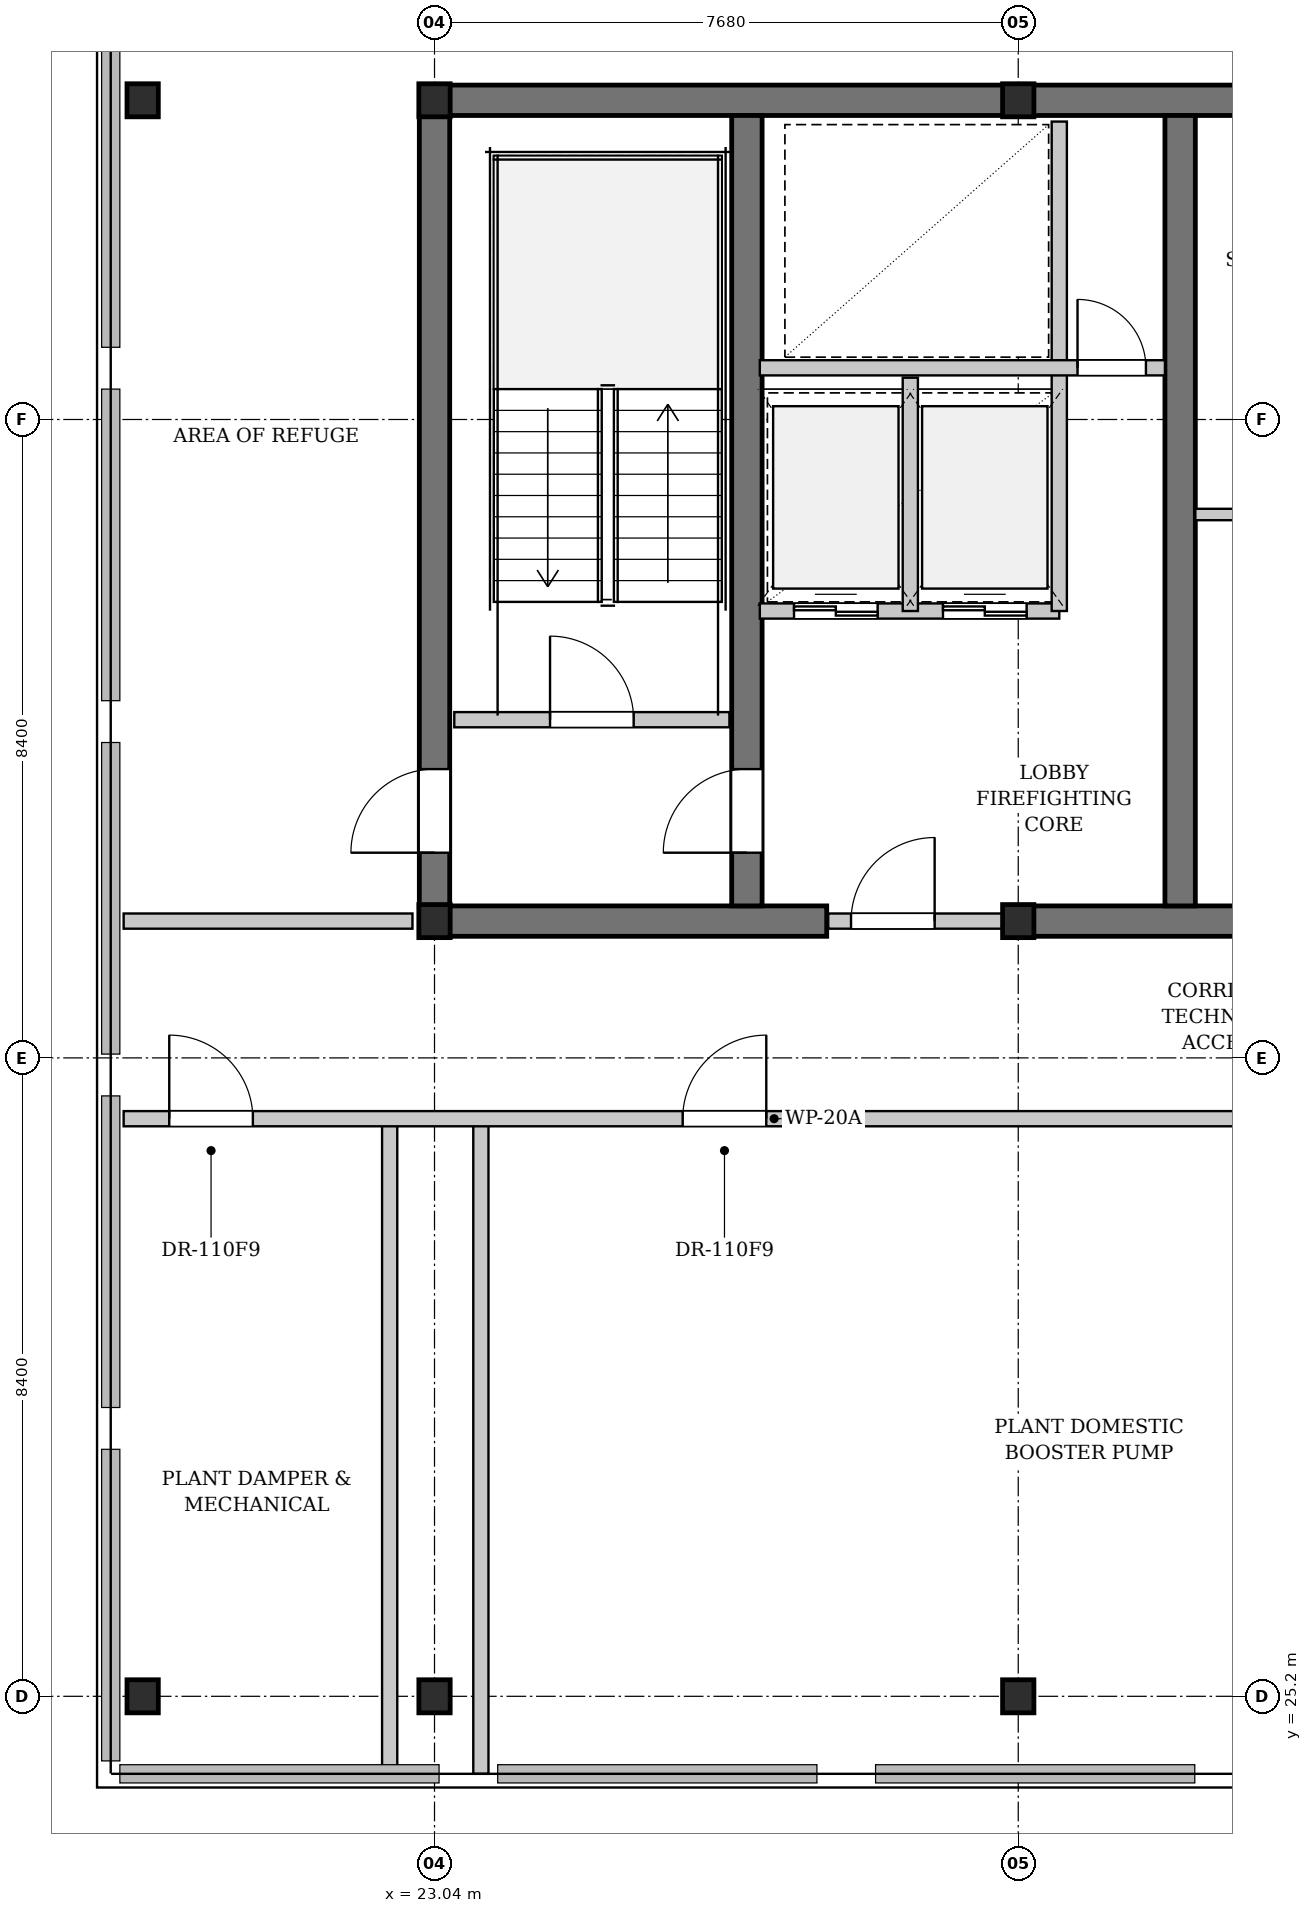
"""IFC4 building model, lengths in metres.
Left out: names, types, materials, properties, quantities, classifications, styles, units other than length and angle.
Written with IfcOpenShell. Run it as: python <this file> out.ifc"""

import sys

from ifc_helpers import new_model, si_unit, direction, frame, frame_2d, origin, origin_2d, place, context, subcontext, project, spatial, rectangle, i_section, extrude, element, fill, save


model = new_model("IFC4")
c1 = context("Model", 3, precision=1e-05, world=origin(), true_north=direction((0.0, 1.0)))
c2 = subcontext(c1, "Body", "Model", "MODEL_VIEW")
j1 = project(units=[si_unit("LENGTHUNIT", "METRE"), si_unit("PLANEANGLEUNIT", "RADIAN")], contexts=[c1])
p1 = place(None, origin())
s1 = spatial("IfcSite", under=j1, at=p1, CompositionType="ELEMENT")
p2 = place(p1, origin())
s2 = spatial("IfcBuilding", under=s1, at=p2, CompositionType="ELEMENT")
p3 = place(p2, frame((0.0, 0.0, 255.2)))
s3 = spatial("IfcBuildingStorey", under=s2, at=p3, CompositionType="ELEMENT", Elevation=255.2)
p4 = place(p3, frame((22.84, 46.2, 0.0), z_axis=(0.0, 0.0, 1.0), x_axis=(1.0, 0.0, 0.0)))
e1 = element("IfcWall", 1, at=p4, inside=s3, PredefinedType="SHEAR", context=c2, shape_type="SweptSolid", body=[
    extrude(rectangle(XDim=31.12, YDim=0.4, at=frame_2d((15.56, 0.0))), origin(), (0.0, 0.0, 1.0), 3.48),
])
p5 = place(p3, frame((22.84, 35.4, 0.0), z_axis=(0.0, 0.0, 1.0), x_axis=(1.0, 0.0, 0.0)))
e2 = element("IfcWall", 2, at=p5, inside=s3, PredefinedType="SHEAR", context=c2, shape_type="SweptSolid", body=[
    extrude(rectangle(XDim=5.36, YDim=0.4, at=frame_2d((2.68, 0.0))), origin(), (0.0, 0.0, 1.0), 3.48),
])
p6 = place(p3, frame((30.72, 35.4, 0.0), z_axis=(0.0, 0.0, 1.0), x_axis=(1.0, 0.0, 0.0)))
e3 = element("IfcWall", 3, at=p6, inside=s3, PredefinedType="SHEAR", context=c2, shape_type="SweptSolid", body=[
    extrude(rectangle(XDim=4.88, YDim=0.4, at=frame_2d((2.44, 0.0))), origin(), (0.0, 0.0, 1.0), 3.48),
])
p7 = place(p3, frame((23.04, 35.6, 0.0), z_axis=(0.0, 0.0, 1.0), x_axis=(0.0, 1.0, 0.0)))
e4 = element("IfcWall", 4, at=p7, inside=s3, PredefinedType="SHEAR", context=c2, shape_type="SweptSolid", body=[
    extrude(rectangle(XDim=10.4, YDim=0.4, at=frame_2d((5.2, 0.0))), origin(), (0.0, 0.0, 1.0), 3.48),
])
p8 = place(p7, frame((0.7, 0.0, 0.0)))
e5 = element("IfcOpeningElement", 5, at=p8, cuts=e4, PredefinedType="OPENING", context=c2, shape_type="SweptSolid", body=[
    extrude(rectangle(XDim=1.1, YDim=2.15, at=frame_2d((0.55, 1.075))), frame((0.0, 0.21, 0.0), z_axis=(0.0, -1.0, 0.0), x_axis=(1.0, 0.0, 0.0)), (0.0, 0.0, 1.0), 0.42),
])
p9 = place(p3, frame((27.15, 35.6, 0.0), z_axis=(0.0, 0.0, 1.0), x_axis=(0.0, 1.0, 0.0)))
e6 = element("IfcWall", 6, at=p9, inside=s3, PredefinedType="SHEAR", context=c2, shape_type="SweptSolid", body=[
    extrude(rectangle(XDim=10.4, YDim=0.4, at=frame_2d((5.2, 0.0))), origin(), (0.0, 0.0, 1.0), 3.48),
])
p10 = place(p9, frame((0.7, 0.0, 0.0)))
e7 = element("IfcOpeningElement", 7, at=p10, cuts=e6, PredefinedType="OPENING", context=c2, shape_type="SweptSolid", body=[
    extrude(rectangle(XDim=1.1, YDim=2.15, at=frame_2d((0.55, 1.075))), frame((0.0, 0.21, 0.0), z_axis=(0.0, -1.0, 0.0), x_axis=(1.0, 0.0, 0.0)), (0.0, 0.0, 1.0), 0.42),
])
p11 = place(p3, frame((32.85, 35.6, 0.0), z_axis=(0.0, 0.0, 1.0), x_axis=(0.0, 1.0, 0.0)))
e8 = element("IfcWall", 8, at=p11, inside=s3, PredefinedType="SHEAR", context=c2, shape_type="SweptSolid", body=[
    extrude(rectangle(XDim=10.4, YDim=0.4, at=frame_2d((5.2, 0.0))), origin(), (0.0, 0.0, 1.0), 3.48),
])
for number, where, z_axis, x_axis in (
    (9, (23.04, 35.4, 0.0), (0.0, 0.0, 1.0), (1.0, 0.0, 0.0)),
    (10, (23.04, 46.2, 0.0), (0.0, 0.0, 1.0), (1.0, 0.0, 0.0)),
    (11, (23.04, 25.2, 0.0), (0.0, 0.0, 1.0), (1.0, 0.0, 0.0)),
    (12, (30.72, 35.4, 0.0), (0.0, 0.0, 1.0), (1.0, 0.0, 0.0)),
    (13, (30.72, 46.2, 0.0), (0.0, 0.0, 1.0), (1.0, 0.0, 0.0)),
    (14, (30.72, 25.2, 0.0), (0.0, 0.0, 1.0), (1.0, 0.0, 0.0)),
    (15, (19.2, 25.2, 0.0), (0.0, 0.0, 1.0), (1.0, 0.0, 0.0)),
    (16, (19.2, 46.2, 0.0), (0.0, 0.0, 1.0), (1.0, 0.0, 0.0)),
):
    element("IfcColumn", number, at=place(p3, frame(where, z_axis=z_axis, x_axis=x_axis)), inside=s3, PredefinedType="COLUMN", context=c2, shape_type="SweptSolid", body=[
        extrude(i_section(OverallWidth=0.412, OverallDepth=0.435, WebThickness=0.036, FlangeThickness=0.058, FilletRadius=0.015, at=origin_2d()), origin(), (0.0, 0.0, 1.0), 3.9),
    ])
p12 = place(p3, frame((23.3, 38.05, 0.0), z_axis=(0.0, 0.0, 1.0), x_axis=(1.0, 0.0, 0.0)))
e17 = element("IfcWall", 17, at=p12, inside=s3, PredefinedType="PARTITIONING", context=c2, shape_type="SweptSolid", body=[
    extrude(rectangle(XDim=3.62, YDim=0.2, at=frame_2d((1.81, 0.0))), origin(), (0.0, 0.0, 1.0), 3.48),
])
p13 = place(p12, frame((1.26, 0.0, 0.0)))
e18 = element("IfcOpeningElement", 18, at=p13, cuts=e17, PredefinedType="OPENING", context=c2, shape_type="SweptSolid", body=[
    extrude(rectangle(XDim=1.1, YDim=2.15, at=frame_2d((0.55, 1.075))), frame((0.0, 0.11, 0.0), z_axis=(0.0, -1.0, 0.0), x_axis=(1.0, 0.0, 0.0)), (0.0, 0.0, 1.0), 0.22),
])
p14 = place(p3, frame((28.22, 35.4, 0.0), z_axis=(0.0, 0.0, 1.0), x_axis=(1.0, 0.0, 0.0)))
e19 = element("IfcWall", 19, at=p14, inside=s3, PredefinedType="PARTITIONING", context=c2, shape_type="SweptSolid", body=[
    extrude(rectangle(XDim=2.5, YDim=0.2, at=frame_2d((1.25, 0.0))), origin(), (0.0, 0.0, 1.0), 2.661),
])
p15 = place(p14, frame((0.3, 0.0, 0.0)))
e20 = element("IfcOpeningElement", 20, at=p15, cuts=e19, PredefinedType="OPENING", context=c2, shape_type="SweptSolid", body=[
    extrude(rectangle(XDim=1.1, YDim=2.15, at=frame_2d((0.55, 1.075))), frame((0.0, 0.11, 0.0), z_axis=(0.0, -1.0, 0.0), x_axis=(1.0, 0.0, 0.0)), (0.0, 0.0, 1.0), 0.22),
])
p16 = place(p3, frame((27.32, 39.48, 0.0), z_axis=(0.0, 0.0, 1.0), x_axis=(1.0, 0.0, 0.0)))
e21 = element("IfcWall", 21, at=p16, inside=s3, PredefinedType="PARTITIONING", context=c2, shape_type="SweptSolid", body=[
    extrude(rectangle(XDim=3.94, YDim=0.2, at=frame_2d((1.97, 0.0))), origin(), (0.0, 0.0, 1.0), 3.48),
])
p17 = place(p16, frame((0.45, 0.0, 0.0)))
e22 = element("IfcOpeningElement", 22, at=p17, cuts=e21, PredefinedType="OPENING", context=c2, shape_type="SweptSolid", body=[
    extrude(rectangle(XDim=1.1, YDim=2.2, at=frame_2d((0.55, 1.1))), frame((0.0, 0.11, 0.0), z_axis=(0.0, -1.0, 0.0), x_axis=(1.0, 0.0, 0.0)), (0.0, 0.0, 1.0), 0.22),
])
p18 = place(p16, frame((2.41, 0.0, 0.0)))
e23 = element("IfcOpeningElement", 23, at=p18, cuts=e21, PredefinedType="OPENING", context=c2, shape_type="SweptSolid", body=[
    extrude(rectangle(XDim=1.1, YDim=2.2, at=frame_2d((0.55, 1.1))), frame((0.0, 0.11, 0.0), z_axis=(0.0, -1.0, 0.0), x_axis=(1.0, 0.0, 0.0)), (0.0, 0.0, 1.0), 0.22),
])
p19 = place(p3, frame((29.3, 39.48, 0.0), z_axis=(0.0, 0.0, 1.0), x_axis=(0.0, 1.0, 0.0)))
e24 = element("IfcWall", 24, at=p19, inside=s3, PredefinedType="PARTITIONING", context=c2, shape_type="SweptSolid", body=[
    extrude(rectangle(XDim=3.07, YDim=0.2, at=frame_2d((1.535, 0.0))), origin(), (0.0, 0.0, 1.0), 3.48),
])
p20 = place(p3, frame((31.26, 39.48, 0.0), z_axis=(0.0, 0.0, 1.0), x_axis=(0.0, 1.0, 0.0)))
e25 = element("IfcWall", 25, at=p20, inside=s3, PredefinedType="PARTITIONING", context=c2, shape_type="SweptSolid", body=[
    extrude(rectangle(XDim=6.44, YDim=0.2, at=frame_2d((3.22, 0.0))), origin(), (0.0, 0.0, 1.0), 3.48),
])
p21 = place(p3, frame((27.32, 42.68, 0.0), z_axis=(0.0, 0.0, 1.0), x_axis=(1.0, 0.0, 0.0)))
e26 = element("IfcWall", 26, at=p21, inside=s3, PredefinedType="PARTITIONING", context=c2, shape_type="SweptSolid", body=[
    extrude(rectangle(XDim=5.33, YDim=0.2, at=frame_2d((2.665, 0.0))), origin(), (0.0, 0.0, 1.0), 3.48),
])
p22 = place(p21, frame((4.18, 0.0, 0.0)))
e27 = element("IfcOpeningElement", 27, at=p22, cuts=e26, PredefinedType="OPENING", context=c2, shape_type="SweptSolid", body=[
    extrude(rectangle(XDim=0.9, YDim=2.15, at=frame_2d((0.45, 1.075))), frame((0.0, 0.11, 0.0), z_axis=(0.0, -1.0, 0.0), x_axis=(1.0, 0.0, 0.0)), (0.0, 0.0, 1.0), 0.22),
])
p23 = place(p3, frame((33.05, 40.75, 0.0), z_axis=(0.0, 0.0, 1.0), x_axis=(1.0, 0.0, 0.0)))
e28 = element("IfcWall", 28, at=p23, inside=s3, PredefinedType="PARTITIONING", context=c2, shape_type="SweptSolid", body=[
    extrude(rectangle(XDim=3.57, YDim=0.15, at=frame_2d((1.785, 0.0))), origin(), (0.0, 0.0, 1.0), 3.48),
])
p24 = place(p3, frame((18.95, 35.4, 0.0), z_axis=(0.0, 0.0, 1.0), x_axis=(1.0, 0.0, 0.0)))
e29 = element("IfcWall", 29, at=p24, inside=s3, PredefinedType="PARTITIONING", context=c2, shape_type="SweptSolid", body=[
    extrude(rectangle(XDim=3.8, YDim=0.2, at=frame_2d((1.9, 0.0))), origin(), (0.0, 0.0, 1.0), 3.48),
])
p25 = place(p3, frame((22.45, 24.18, 0.0), z_axis=(0.0, 0.0, 1.0), x_axis=(0.0, 1.0, 0.0)))
e30 = element("IfcWall", 30, at=p25, inside=s3, PredefinedType="PARTITIONING", context=c2, shape_type="SweptSolid", body=[
    extrude(rectangle(XDim=8.62, YDim=0.2, at=frame_2d((4.31, 0.0))), origin(), (0.0, 0.0, 1.0), 2.275),
])
p26 = place(p3, frame((23.65, 24.18, 0.0), z_axis=(0.0, 0.0, 1.0), x_axis=(0.0, 1.0, 0.0)))
e31 = element("IfcWall", 31, at=p26, inside=s3, PredefinedType="PARTITIONING", context=c2, shape_type="SweptSolid", body=[
    extrude(rectangle(XDim=8.62, YDim=0.2, at=frame_2d((4.31, 0.0))), origin(), (0.0, 0.0, 1.0), 3.48),
])
p27 = place(p3, frame((18.95, 32.8, 0.0), z_axis=(0.0, 0.0, 1.0), x_axis=(1.0, 0.0, 0.0)))
e32 = element("IfcWall", 32, at=p27, inside=s3, PredefinedType="PARTITIONING", context=c2, shape_type="SweptSolid", body=[
    extrude(rectangle(XDim=38.9, YDim=0.2, at=frame_2d((19.45, 0.0))), origin(), (0.0, 0.0, 1.0), 2.275),
])
p28 = place(p27, frame((0.6, 0.0, 0.0)))
e33 = element("IfcOpeningElement", 33, at=p28, cuts=e32, PredefinedType="OPENING", context=c2, shape_type="SweptSolid", body=[
    extrude(rectangle(XDim=1.1, YDim=2.15, at=frame_2d((0.55, 1.075))), frame((0.0, 0.11, 0.0), z_axis=(0.0, -1.0, 0.0), x_axis=(1.0, 0.0, 0.0)), (0.0, 0.0, 1.0), 0.22),
])
p29 = place(p27, frame((7.355, 0.0, 0.0)))
e34 = element("IfcOpeningElement", 34, at=p29, cuts=e32, PredefinedType="OPENING", context=c2, shape_type="SweptSolid", body=[
    extrude(rectangle(XDim=1.1, YDim=2.15, at=frame_2d((0.55, 1.075))), frame((0.0, 0.11, 0.0), z_axis=(0.0, -1.0, 0.0), x_axis=(1.0, 0.0, 0.0)), (0.0, 0.0, 1.0), 0.22),
])
p30 = place(p27, frame((22.761, 0.0, 0.0)))
e35 = element("IfcOpeningElement", 35, at=p30, cuts=e32, PredefinedType="OPENING", context=c2, shape_type="SweptSolid", body=[
    extrude(rectangle(XDim=1.1, YDim=2.15, at=frame_2d((0.55, 1.075))), frame((0.0, 0.11, 0.0), z_axis=(0.0, -1.0, 0.0), x_axis=(1.0, 0.0, 0.0)), (0.0, 0.0, 1.0), 0.22),
])
p31 = place(p27, frame((37.2, 0.0, 0.0)))
e36 = element("IfcOpeningElement", 36, at=p31, cuts=e32, PredefinedType="OPENING", context=c2, shape_type="SweptSolid", body=[
    extrude(rectangle(XDim=1.1, YDim=2.15, at=frame_2d((0.55, 1.075))), frame((0.0, 0.11, 0.0), z_axis=(0.0, -1.0, 0.0), x_axis=(1.0, 0.0, 0.0)), (0.0, 0.0, 1.0), 0.22),
])
p32 = place(p13, origin())
e37 = element("IfcDoor", 37, at=p32, inside=s3, OperationType="SINGLE_SWING_LEFT", PredefinedType="DOOR", context=c2, shape_type="SweptSolid", body=[
    extrude(rectangle(XDim=1.1, YDim=2.15, at=frame_2d((0.55, 1.075))), frame((0.0, 0.025, 0.0), z_axis=(0.0, -1.0, 0.0), x_axis=(1.0, 0.0, 0.0)), (0.0, 0.0, 1.0), 0.05),
])
fill(e18, e37)
p33 = place(p15, origin())
e38 = element("IfcDoor", 38, at=p33, inside=s3, OperationType="SINGLE_SWING_RIGHT", PredefinedType="DOOR", context=c2, shape_type="SweptSolid", body=[
    extrude(rectangle(XDim=1.1, YDim=2.15, at=frame_2d((0.55, 1.075))), frame((0.0, 0.025, 0.0), z_axis=(0.0, -1.0, 0.0), x_axis=(1.0, 0.0, 0.0)), (0.0, 0.0, 1.0), 0.05),
])
fill(e20, e38)
p34 = place(p17, origin())
e39 = element("IfcDoor", 39, at=p34, inside=s3, OperationType="DOUBLE_DOOR_SLIDING", PredefinedType="DOOR", context=c2, shape_type="SweptSolid", body=[
    extrude(rectangle(XDim=1.1, YDim=2.2, at=frame_2d((0.55, 1.1))), frame((0.0, 0.025, 0.0), z_axis=(0.0, -1.0, 0.0), x_axis=(1.0, 0.0, 0.0)), (0.0, 0.0, 1.0), 0.05),
])
fill(e22, e39)
p35 = place(p18, origin())
e40 = element("IfcDoor", 40, at=p35, inside=s3, OperationType="DOUBLE_DOOR_SLIDING", PredefinedType="DOOR", context=c2, shape_type="SweptSolid", body=[
    extrude(rectangle(XDim=1.1, YDim=2.2, at=frame_2d((0.55, 1.1))), frame((0.0, 0.025, 0.0), z_axis=(0.0, -1.0, 0.0), x_axis=(1.0, 0.0, 0.0)), (0.0, 0.0, 1.0), 0.05),
])
fill(e23, e40)
p36 = place(p22, origin())
e41 = element("IfcDoor", 41, at=p36, inside=s3, OperationType="SINGLE_SWING_LEFT", PredefinedType="DOOR", context=c2, shape_type="SweptSolid", body=[
    extrude(rectangle(XDim=0.9, YDim=2.15, at=frame_2d((0.45, 1.075))), frame((0.0, 0.025, 0.0), z_axis=(0.0, -1.0, 0.0), x_axis=(1.0, 0.0, 0.0)), (0.0, 0.0, 1.0), 0.05),
])
fill(e27, e41)
p37 = place(p28, origin())
e42 = element("IfcDoor", 42, at=p37, inside=s3, OperationType="SINGLE_SWING_LEFT", PredefinedType="DOOR", context=c2, shape_type="SweptSolid", body=[
    extrude(rectangle(XDim=1.1, YDim=2.15, at=frame_2d((0.55, 1.075))), frame((0.0, 0.025, 0.0), z_axis=(0.0, -1.0, 0.0), x_axis=(1.0, 0.0, 0.0)), (0.0, 0.0, 1.0), 0.05),
])
fill(e33, e42)
p38 = place(p29, origin())
e43 = element("IfcDoor", 43, at=p38, inside=s3, OperationType="SINGLE_SWING_RIGHT", PredefinedType="DOOR", context=c2, shape_type="SweptSolid", body=[
    extrude(rectangle(XDim=1.1, YDim=2.15, at=frame_2d((0.55, 1.075))), frame((0.0, 0.025, 0.0), z_axis=(0.0, -1.0, 0.0), x_axis=(1.0, 0.0, 0.0)), (0.0, 0.0, 1.0), 0.05),
])
fill(e34, e43)
p39 = place(p10, origin())
e44 = element("IfcDoor", 44, at=p39, inside=s3, OperationType="SINGLE_SWING_LEFT", PredefinedType="DOOR", context=c2, shape_type="SweptSolid", body=[
    extrude(rectangle(XDim=1.1, YDim=2.15, at=frame_2d((0.55, 1.075))), frame((0.0, 0.025, 0.0), z_axis=(0.0, -1.0, 0.0), x_axis=(1.0, 0.0, 0.0)), (0.0, 0.0, 1.0), 0.05),
])
fill(e7, e44)
p40 = place(p8, origin())
e45 = element("IfcDoor", 45, at=p40, inside=s3, OperationType="SINGLE_SWING_LEFT", PredefinedType="DOOR", context=c2, shape_type="SweptSolid", body=[
    extrude(rectangle(XDim=1.1, YDim=2.15, at=frame_2d((0.55, 1.075))), frame((0.0, 0.025, 0.0), z_axis=(0.0, -1.0, 0.0), x_axis=(1.0, 0.0, 0.0)), (0.0, 0.0, 1.0), 0.05),
])
fill(e5, e45)
save(model, sys.argv[1])
